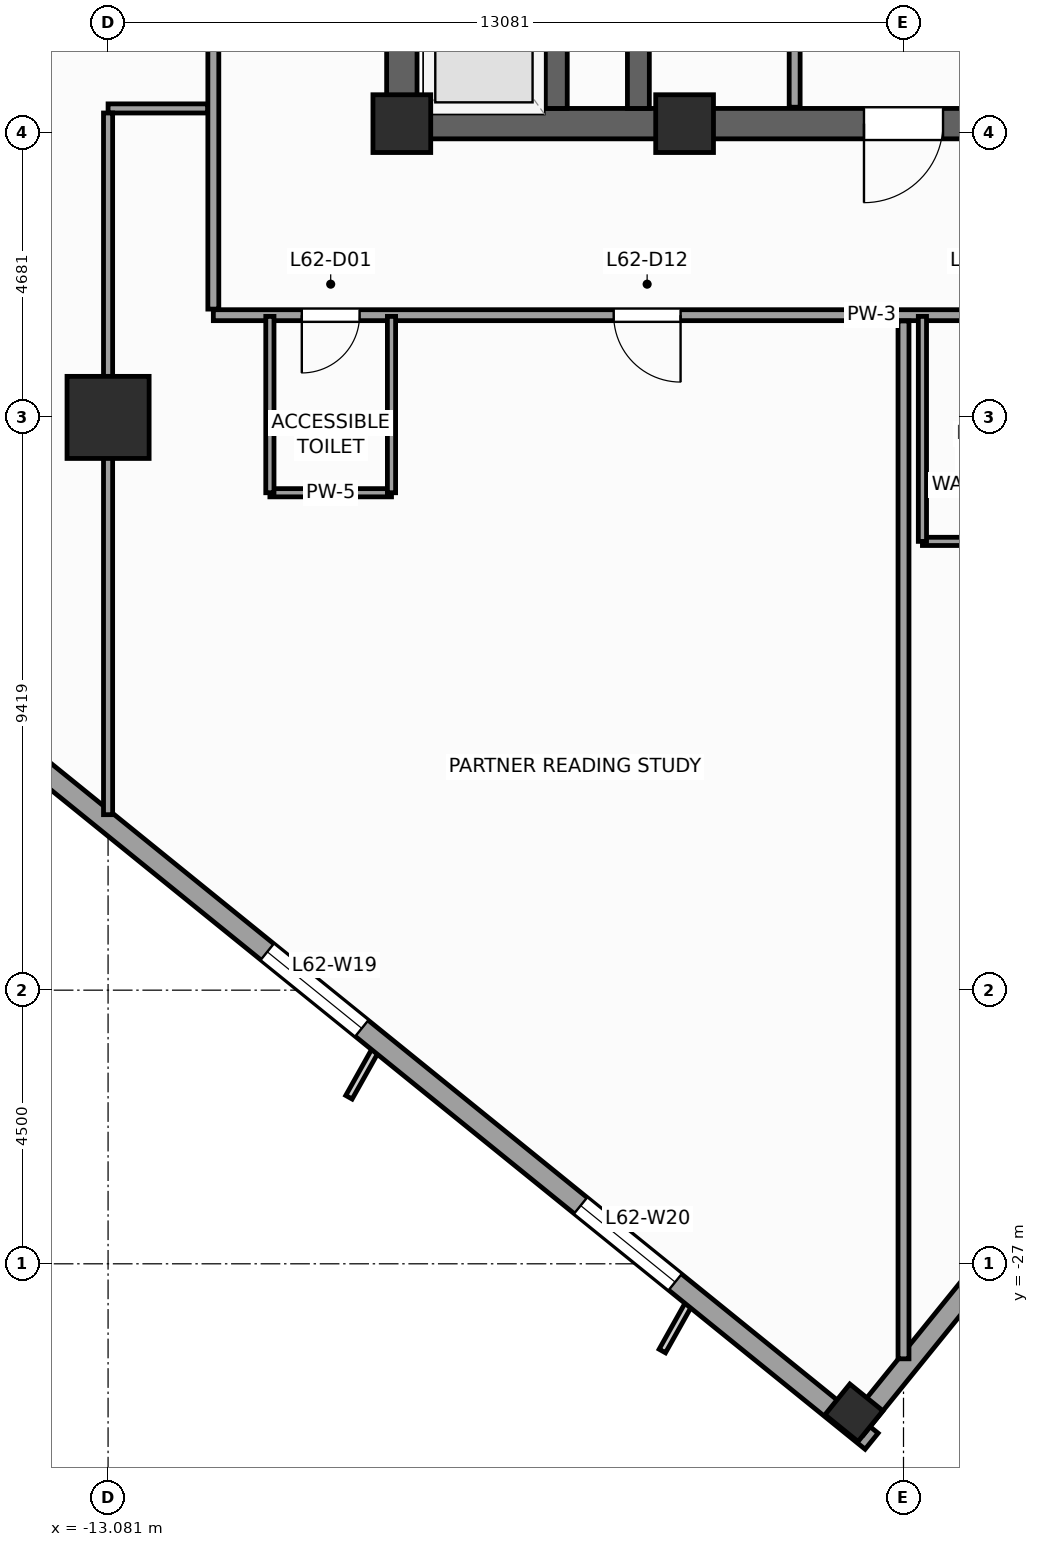
"""IFC4 building model, lengths in metres.
Left out: names, types, materials, properties, quantities, classifications, styles, units other than length and angle.
Written with IfcOpenShell. Run it as: python <this file> out.ifc"""

import sys

from ifc_helpers import new_model, si_unit, direction, frame, frame_2d, origin, origin_2d, place, context, subcontext, project, spatial, rectangle, extrude, source, transform, mapped, element, fill, save


model = new_model("IFC4")
c1 = context("Model", 3, precision=1e-05, world=origin(), true_north=direction((0.0, 1.0)))
c2 = subcontext(c1, "Body", "Model", "MODEL_VIEW")
j1 = project(units=[si_unit("LENGTHUNIT", "METRE"), si_unit("PLANEANGLEUNIT", "RADIAN")], contexts=[c1])
p1 = place(None, origin())
s1 = spatial("IfcSite", under=j1, at=p1, CompositionType="ELEMENT")
p2 = place(p1, origin())
s2 = spatial("IfcBuilding", under=s1, at=p2, CompositionType="ELEMENT")
p3 = place(p2, frame((0.0, 0.0, 256.3)))
s3 = spatial("IfcBuildingStorey", under=s2, at=p3, CompositionType="ELEMENT", Elevation=256.3)
p4 = place(p3, frame((-8.5, -8.25, 0.0), z_axis=(0.0, 0.0, 1.0), x_axis=(1.0, 0.0, 0.0)))
e1 = element("IfcWall", 1, at=p4, inside=s3, PredefinedType="SHEAR", context=c2, shape_type="SweptSolid", body=[
    extrude(rectangle(XDim=17.0, YDim=0.5, at=frame_2d((8.5, 0.0))), origin(), (0.0, 0.0, 1.0), 3.9),
])
p5 = place(p4, frame((7.85, 0.0, 0.0)))
e2 = element("IfcOpeningElement", 2, at=p5, cuts=e1, PredefinedType="OPENING", context=c2, shape_type="SweptSolid", body=[
    extrude(rectangle(XDim=1.3, YDim=2.2, at=frame_2d((0.65, 1.1))), frame((0.0, 0.26, 0.0), z_axis=(0.0, -1.0, 0.0), x_axis=(1.0, 0.0, 0.0)), (0.0, 0.0, 1.0), 0.52),
])
p6 = place(p3, frame((-8.25, -8.0, 0.0), z_axis=(0.0, 0.0, 1.0), x_axis=(0.0, 1.0, 0.0)))
e3 = element("IfcWall", 3, at=p6, inside=s3, PredefinedType="SHEAR", context=c2, shape_type="SweptSolid", body=[
    extrude(rectangle(XDim=16.0, YDim=0.5, at=frame_2d((8.0, 0.0))), origin(), (0.0, 0.0, 1.0), 3.9),
])
p7 = place(p6, frame((4.69, 0.0, 0.0)))
e4 = element("IfcOpeningElement", 4, at=p7, cuts=e3, PredefinedType="OPENING", context=c2, shape_type="SweptSolid", body=[
    extrude(rectangle(XDim=1.3, YDim=2.2, at=frame_2d((0.65, 1.1))), frame((0.0, 0.26, 0.0), z_axis=(0.0, -1.0, 0.0), x_axis=(1.0, 0.0, 0.0)), (0.0, 0.0, 1.0), 0.52),
])
p8 = place(p3, frame((-4.36, -8.0, 0.0), z_axis=(0.0, 0.0, 1.0), x_axis=(0.0, 1.0, 0.0)))
e5 = element("IfcWall", 5, at=p8, inside=s3, PredefinedType="SHEAR", context=c2, shape_type="SweptSolid", body=[
    extrude(rectangle(XDim=16.0, YDim=0.36, at=frame_2d((8.0, 0.0))), origin(), (0.0, 0.0, 1.0), 3.9),
])
p9 = place(p3, frame((-5.71, -8.0, 0.0), z_axis=(0.0, 0.0, 1.0), x_axis=(0.0, 1.0, 0.0)))
e6 = element("IfcWall", 6, at=p9, inside=s3, PredefinedType="SHEAR", context=c2, shape_type="SweptSolid", body=[
    extrude(rectangle(XDim=2.54, YDim=0.36, at=frame_2d((1.27, 0.0))), origin(), (0.0, 0.0, 1.0), 3.9),
])
m1 = source(origin(), c2, "Body", "SweptSolid", [
    extrude(rectangle(XDim=0.95, YDim=0.95, at=origin_2d()), origin(), (0.0, 0.0, 1.0), 3.9),
])
for number, where, z_axis, x_axis in (
    (7, (-8.25, -8.25, 0.0), (0.0, 0.0, 1.0), (1.0, 0.0, 0.0)),
    (8, (-3.6, -8.25, 0.0), (0.0, 0.0, 1.0), (1.0, 0.0, 0.0)),
):
    element("IfcColumn", number, at=place(p3, frame(where, z_axis=z_axis, x_axis=x_axis)), inside=s3, PredefinedType="PILASTER", context=c2, shape_type="MappedRepresentation", body=[
        mapped(m1, transform((0.0, 0.0, 0.0), scale=1.0)),
    ])
m2 = source(origin(), c2, "Body", "SweptSolid", [
    extrude(rectangle(XDim=1.35, YDim=1.35, at=origin_2d()), origin(), (0.0, 0.0, 1.0), 3.9),
])
p10 = place(p3, frame((-13.081, -13.081, 0.0), z_axis=(0.0, 0.0, 1.0), x_axis=(1.0, 0.0, 0.0)))
e9 = element("IfcColumn", 9, at=p10, inside=s3, PredefinedType="COLUMN", context=c2, shape_type="MappedRepresentation", body=[
    mapped(m2, transform((0.0, 0.0, 0.0), scale=1.0)),
])
m3 = source(origin(), c2, "Body", "SweptSolid", [
    extrude(rectangle(XDim=0.65, YDim=0.7, at=origin_2d()), origin(), (0.0, 0.0, 1.0), 3.9),
])
p11 = place(p3, frame((-0.815, -29.45, 0.0), z_axis=(0.0, 0.0, 1.0), x_axis=(0.62932039105, 0.777145961457, 0.0)))
e10 = element("IfcColumn", 10, at=p11, inside=s3, PredefinedType="COLUMN", context=c2, shape_type="MappedRepresentation", body=[
    mapped(m3, transform((0.0, 0.0, 0.0), scale=1.0)),
])
p12 = place(p3, frame((-29.154, -6.733, 0.0), z_axis=(0.0, 0.0, 1.0), x_axis=(0.77714192302, -0.629325378072, 0.0)))
e11 = element("IfcWall", 11, at=p12, inside=s3, PredefinedType="STANDARD", context=c2, shape_type="SweptSolid", body=[
    extrude(rectangle(XDim=36.84, YDim=0.34, at=frame_2d((18.42, 0.0))), origin(), (0.0, 0.0, 1.0), 2.02),
])
p13 = place(p12, frame((3.421, 0.0, 0.49)))
e12 = element("IfcOpeningElement", 12, at=p13, cuts=e11, PredefinedType="OPENING", context=c2, shape_type="SweptSolid", body=[
    extrude(rectangle(XDim=2.0, YDim=1.45, at=frame_2d((1.0, 0.725))), frame((0.0, 0.18, 0.0), z_axis=(0.0, -1.0, 0.0), x_axis=(1.0, 0.0, 0.0)), (0.0, 0.0, 1.0), 0.36),
])
p14 = place(p12, frame((9.684, 0.0, 0.49)))
e13 = element("IfcOpeningElement", 13, at=p14, cuts=e11, PredefinedType="OPENING", context=c2, shape_type="SweptSolid", body=[
    extrude(rectangle(XDim=2.0, YDim=1.45, at=frame_2d((1.0, 0.725))), frame((0.0, 0.18, 0.0), z_axis=(0.0, -1.0, 0.0), x_axis=(1.0, 0.0, 0.0)), (0.0, 0.0, 1.0), 0.36),
])
p15 = place(p12, frame((15.183, 0.0, 0.49)))
e14 = element("IfcOpeningElement", 14, at=p15, cuts=e11, PredefinedType="OPENING", context=c2, shape_type="SweptSolid", body=[
    extrude(rectangle(XDim=2.0, YDim=1.45, at=frame_2d((1.0, 0.725))), frame((0.0, 0.18, 0.0), z_axis=(0.0, -1.0, 0.0), x_axis=(1.0, 0.0, 0.0)), (0.0, 0.0, 1.0), 0.36),
])
p16 = place(p12, frame((24.051, 0.0, 0.49)))
e15 = element("IfcOpeningElement", 15, at=p16, cuts=e11, PredefinedType="OPENING", context=c2, shape_type="SweptSolid", body=[
    extrude(rectangle(XDim=2.0, YDim=1.45, at=frame_2d((1.0, 0.725))), frame((0.0, 0.18, 0.0), z_axis=(0.0, -1.0, 0.0), x_axis=(1.0, 0.0, 0.0)), (0.0, 0.0, 1.0), 0.36),
])
p17 = place(p12, frame((30.682, 0.0, 0.49)))
e16 = element("IfcOpeningElement", 16, at=p17, cuts=e11, PredefinedType="OPENING", context=c2, shape_type="SweptSolid", body=[
    extrude(rectangle(XDim=2.0, YDim=1.45, at=frame_2d((1.0, 0.725))), frame((0.0, 0.18, 0.0), z_axis=(0.0, -1.0, 0.0), x_axis=(1.0, 0.0, 0.0)), (0.0, 0.0, 1.0), 0.36),
])
p18 = place(p3, frame((-0.789, -29.703, 0.0), z_axis=(0.0, 0.0, 1.0), x_axis=(0.629323365087, 0.77714355312, 0.0)))
e17 = element("IfcWall", 17, at=p18, inside=s3, PredefinedType="STANDARD", context=c2, shape_type="SweptSolid", body=[
    extrude(rectangle(XDim=5.5, YDim=0.34, at=frame_2d((2.75, 0.0))), origin(), (0.0, 0.0, 1.0), 3.5),
])
p19 = place(p3, frame((-1.79, -7.98, 0.0), z_axis=(0.0, 0.0, 1.0), x_axis=(0.0, 1.0, 0.0)))
e18 = element("IfcWall", 18, at=p19, inside=s3, PredefinedType="PARTITIONING", context=c2, shape_type="SweptSolid", body=[
    extrude(rectangle(XDim=12.38, YDim=0.18, at=frame_2d((6.19, 0.0))), origin(), (0.0, 0.0, 1.0), 3.5),
])
p20 = place(p19, frame((8.8, 0.0, 0.0)))
e19 = element("IfcOpeningElement", 19, at=p20, cuts=e18, PredefinedType="OPENING", context=c2, shape_type="SweptSolid", body=[
    extrude(rectangle(XDim=1.1, YDim=2.2, at=frame_2d((0.55, 1.1))), frame((0.0, 0.1, 0.0), z_axis=(0.0, -1.0, 0.0), x_axis=(1.0, 0.0, 0.0)), (0.0, 0.0, 1.0), 0.2),
])
p21 = place(p19, frame((10.86, 0.0, 0.0)))
e20 = element("IfcOpeningElement", 20, at=p21, cuts=e18, PredefinedType="OPENING", context=c2, shape_type="SweptSolid", body=[
    extrude(rectangle(XDim=1.1, YDim=2.2, at=frame_2d((0.55, 1.1))), frame((0.0, 0.1, 0.0), z_axis=(0.0, -1.0, 0.0), x_axis=(1.0, 0.0, 0.0)), (0.0, 0.0, 1.0), 0.2),
])
p22 = place(p19, frame((1.4, 0.0, 0.0)))
e21 = element("IfcOpeningElement", 21, at=p22, cuts=e18, PredefinedType="OPENING", context=c2, shape_type="SweptSolid", body=[
    extrude(rectangle(XDim=1.15, YDim=2.25, at=frame_2d((0.575, 1.125))), frame((0.0, 0.1, 0.0), z_axis=(0.0, -1.0, 0.0), x_axis=(1.0, 0.0, 0.0)), (0.0, 0.0, 1.0), 0.2),
])
p23 = place(p19, frame((5.6, 0.0, 0.0)))
e22 = element("IfcOpeningElement", 22, at=p23, cuts=e18, PredefinedType="OPENING", context=c2, shape_type="SweptSolid", body=[
    extrude(rectangle(XDim=1.15, YDim=2.25, at=frame_2d((0.575, 1.125))), frame((0.0, 0.1, 0.0), z_axis=(0.0, -1.0, 0.0), x_axis=(1.0, 0.0, 0.0)), (0.0, 0.0, 1.0), 0.2),
])
p24 = place(p3, frame((-11.35, -11.4, 0.0), z_axis=(0.0, 0.0, 1.0), x_axis=(1.0, 0.0, 0.0)))
e23 = element("IfcWall", 23, at=p24, inside=s3, PredefinedType="PARTITIONING", context=c2, shape_type="SweptSolid", body=[
    extrude(rectangle(XDim=21.65, YDim=0.18, at=frame_2d((10.825, 0.0))), origin(), (0.0, 0.0, 1.0), 3.5),
])
p25 = place(p24, frame((1.455, 0.0, 0.0)))
e24 = element("IfcOpeningElement", 24, at=p25, cuts=e23, PredefinedType="OPENING", context=c2, shape_type="SweptSolid", body=[
    extrude(rectangle(XDim=0.95, YDim=2.1, at=frame_2d((0.475, 1.05))), frame((0.0, 0.1, 0.0), z_axis=(0.0, -1.0, 0.0), x_axis=(1.0, 0.0, 0.0)), (0.0, 0.0, 1.0), 0.2),
])
p26 = place(p24, frame((12.311, 0.0, 0.0)))
e25 = element("IfcOpeningElement", 25, at=p26, cuts=e23, PredefinedType="OPENING", context=c2, shape_type="SweptSolid", body=[
    extrude(rectangle(XDim=0.95, YDim=2.1, at=frame_2d((0.475, 1.05))), frame((0.0, 0.1, 0.0), z_axis=(0.0, -1.0, 0.0), x_axis=(1.0, 0.0, 0.0)), (0.0, 0.0, 1.0), 0.2),
])
p27 = place(p24, frame((17.06, 0.0, 0.0)))
e26 = element("IfcOpeningElement", 26, at=p27, cuts=e23, PredefinedType="OPENING", context=c2, shape_type="SweptSolid", body=[
    extrude(rectangle(XDim=1.1, YDim=2.2, at=frame_2d((0.55, 1.1))), frame((0.0, 0.1, 0.0), z_axis=(0.0, -1.0, 0.0), x_axis=(1.0, 0.0, 0.0)), (0.0, 0.0, 1.0), 0.2),
])
p28 = place(p24, frame((6.584, 0.0, 0.0)))
e27 = element("IfcOpeningElement", 27, at=p28, cuts=e23, PredefinedType="OPENING", context=c2, shape_type="SweptSolid", body=[
    extrude(rectangle(XDim=1.1, YDim=2.2, at=frame_2d((0.55, 1.1))), frame((0.0, 0.1, 0.0), z_axis=(0.0, -1.0, 0.0), x_axis=(1.0, 0.0, 0.0)), (0.0, 0.0, 1.0), 0.2),
])
p29 = place(p3, frame((-11.35, -11.3, 0.0), z_axis=(0.0, 0.0, 1.0), x_axis=(0.0, 1.0, 0.0)))
e28 = element("IfcWall", 28, at=p29, inside=s3, PredefinedType="PARTITIONING", context=c2, shape_type="SweptSolid", body=[
    extrude(rectangle(XDim=23.65, YDim=0.18, at=frame_2d((11.825, 0.0))), origin(), (0.0, 0.0, 1.0), 3.5),
])
p30 = place(p29, frame((13.1, 0.0, 0.0)))
e29 = element("IfcOpeningElement", 29, at=p30, cuts=e28, PredefinedType="OPENING", context=c2, shape_type="SweptSolid", body=[
    extrude(rectangle(XDim=1.1, YDim=2.2, at=frame_2d((0.55, 1.1))), frame((0.0, 0.1, 0.0), z_axis=(0.0, -1.0, 0.0), x_axis=(1.0, 0.0, 0.0)), (0.0, 0.0, 1.0), 0.2),
])
p31 = place(p29, frame((16.85, 0.0, 0.0)))
e30 = element("IfcOpeningElement", 30, at=p31, cuts=e28, PredefinedType="OPENING", context=c2, shape_type="SweptSolid", body=[
    extrude(rectangle(XDim=1.1, YDim=2.2, at=frame_2d((0.55, 1.1))), frame((0.0, 0.1, 0.0), z_axis=(0.0, -1.0, 0.0), x_axis=(1.0, 0.0, 0.0)), (0.0, 0.0, 1.0), 0.2),
])
p32 = place(p29, frame((5.0, 0.0, 0.0)))
e31 = element("IfcOpeningElement", 31, at=p32, cuts=e28, PredefinedType="OPENING", context=c2, shape_type="SweptSolid", body=[
    extrude(rectangle(XDim=1.1, YDim=2.2, at=frame_2d((0.55, 1.1))), frame((0.0, 0.1, 0.0), z_axis=(0.0, -1.0, 0.0), x_axis=(1.0, 0.0, 0.0)), (0.0, 0.0, 1.0), 0.2),
])
p33 = place(p29, frame((9.25, 0.0, 0.0)))
e32 = element("IfcOpeningElement", 32, at=p33, cuts=e28, PredefinedType="OPENING", context=c2, shape_type="SweptSolid", body=[
    extrude(rectangle(XDim=1.1, YDim=2.2, at=frame_2d((0.55, 1.1))), frame((0.0, 0.1, 0.0), z_axis=(0.0, -1.0, 0.0), x_axis=(1.0, 0.0, 0.0)), (0.0, 0.0, 1.0), 0.2),
])
p34 = place(p3, frame((0.0, -11.495, 0.0), z_axis=(0.0, 0.0, 1.0), x_axis=(0.0, -1.0, 0.0)))
e33 = element("IfcWall", 33, at=p34, inside=s3, PredefinedType="PARTITIONING", context=c2, shape_type="SweptSolid", body=[
    extrude(rectangle(XDim=17.067, YDim=0.18, at=frame_2d((8.534, 0.0))), origin(), (0.0, 0.0, 1.0), 3.5),
])
p35 = place(p3, frame((-11.445, -8.0, 0.0), z_axis=(0.0, 0.0, 1.0), x_axis=(-1.0, 0.0, 0.0)))
e34 = element("IfcWall", 34, at=p35, inside=s3, PredefinedType="PARTITIONING", context=c2, shape_type="SweptSolid", body=[
    extrude(rectangle(XDim=1.636, YDim=0.15, at=frame_2d((0.818, 0.0))), origin(), (0.0, 0.0, 1.0), 3.5),
])
p36 = place(p3, frame((-13.081, -8.075, 0.0), z_axis=(0.0, 0.0, 1.0), x_axis=(0.0, -1.0, 0.0)))
e35 = element("IfcWall", 35, at=p36, inside=s3, PredefinedType="PARTITIONING", context=c2, shape_type="SweptSolid", body=[
    extrude(rectangle(XDim=11.539, YDim=0.15, at=frame_2d((5.77, 0.0))), origin(), (0.0, 0.0, 1.0), 2.05),
])
p37 = place(p3, frame((-10.42, -14.32, 0.0), z_axis=(0.0, 0.0, 1.0), x_axis=(1.0, 0.0, 0.0)))
e36 = element("IfcWall", 36, at=p37, inside=s3, PredefinedType="PARTITIONING", context=c2, shape_type="SweptSolid", body=[
    extrude(rectangle(XDim=2.0, YDim=0.135, at=frame_2d((1.0, 0.0))), origin(), (0.0, 0.0, 1.0), 3.5),
])
for number, where, z_axis, x_axis in (
    (37, (-8.42, -14.32, 0.0), (0.0, 0.0, 1.0), (0.0, 1.0, 0.0)),
    (38, (-10.42, -14.32, 0.0), (0.0, 0.0, 1.0), (0.0, 1.0, 0.0)),
):
    element("IfcWall", number, at=place(p3, frame(where, z_axis=z_axis, x_axis=x_axis)), inside=s3, PredefinedType="PARTITIONING", context=c2, shape_type="SweptSolid", body=[
        extrude(rectangle(XDim=2.9, YDim=0.135, at=frame_2d((1.45, 0.0))), origin(), (0.0, 0.0, 1.0), 3.5),
    ])
p38 = place(p3, frame((0.311, -15.12, 0.0), z_axis=(0.0, 0.0, 1.0), x_axis=(1.0, 0.0, 0.0)))
e39 = element("IfcWall", 39, at=p38, inside=s3, PredefinedType="PARTITIONING", context=c2, shape_type="SweptSolid", body=[
    extrude(rectangle(XDim=2.25, YDim=0.135, at=frame_2d((1.125, 0.0))), origin(), (0.0, 0.0, 1.0), 3.5),
])
p39 = place(p3, frame((0.311, -15.12, 0.0), z_axis=(0.0, 0.0, 1.0), x_axis=(0.0, 1.0, 0.0)))
e40 = element("IfcWall", 40, at=p39, inside=s3, PredefinedType="PARTITIONING", context=c2, shape_type="SweptSolid", body=[
    extrude(rectangle(XDim=3.7, YDim=0.135, at=frame_2d((1.85, 0.0))), origin(), (0.0, 0.0, 1.0), 3.5),
])
m4 = source(origin(), c2, "Body", "SweptSolid", [
    extrude(rectangle(XDim=2.0, YDim=1.45, at=frame_2d((1.0, 0.725))), frame((0.0, 0.03, 0.0), z_axis=(0.0, -1.0, 0.0), x_axis=(1.0, 0.0, 0.0)), (0.0, 0.0, 1.0), 0.06),
])
p40 = place(p16, origin())
e41 = element("IfcWindow", 41, at=p40, inside=s3, PartitioningType="SINGLE_PANEL", PredefinedType="WINDOW", context=c2, shape_type="MappedRepresentation", body=[
    mapped(m4, transform((0.0, 0.0, 0.0), scale=1.0)),
])
fill(e15, e41)
p41 = place(p17, origin())
e42 = element("IfcWindow", 42, at=p41, inside=s3, PartitioningType="SINGLE_PANEL", PredefinedType="WINDOW", context=c2, shape_type="MappedRepresentation", body=[
    mapped(m4, transform((0.0, 0.0, 0.0), scale=1.0)),
])
fill(e16, e42)
m5 = source(origin(), c2, "Body", "SweptSolid", [
    extrude(rectangle(XDim=1.3, YDim=2.2, at=frame_2d((0.65, 1.1))), frame((0.0, 0.025, 0.0), z_axis=(0.0, -1.0, 0.0), x_axis=(1.0, 0.0, 0.0)), (0.0, 0.0, 1.0), 0.05),
])
p42 = place(p5, frame((1.3, 0.0, 0.0), z_axis=(0.0, 0.0, 1.0), x_axis=(-1.0, 0.0, 0.0)))
e43 = element("IfcDoor", 43, at=p42, inside=s3, OperationType="SINGLE_SWING_LEFT", PredefinedType="DOOR", context=c2, shape_type="MappedRepresentation", body=[
    mapped(m5, transform((0.0, 0.0, 0.0), scale=1.0)),
])
fill(e2, e43)
m6 = source(origin(), c2, "Body", "SweptSolid", [
    extrude(rectangle(XDim=0.95, YDim=2.1, at=frame_2d((0.475, 1.05))), frame((0.0, 0.025, 0.0), z_axis=(0.0, -1.0, 0.0), x_axis=(1.0, 0.0, 0.0)), (0.0, 0.0, 1.0), 0.05),
])
p43 = place(p25, frame((0.95, 0.0, 0.0), z_axis=(0.0, 0.0, 1.0), x_axis=(-1.0, 0.0, 0.0)))
e44 = element("IfcDoor", 44, at=p43, inside=s3, OperationType="SINGLE_SWING_LEFT", PredefinedType="DOOR", context=c2, shape_type="MappedRepresentation", body=[
    mapped(m6, transform((0.0, 0.0, 0.0), scale=1.0)),
])
fill(e24, e44)
m7 = source(origin(), c2, "Body", "SweptSolid", [
    extrude(rectangle(XDim=1.1, YDim=2.2, at=frame_2d((0.55, 1.1))), frame((0.0, 0.025, 0.0), z_axis=(0.0, -1.0, 0.0), x_axis=(1.0, 0.0, 0.0)), (0.0, 0.0, 1.0), 0.05),
])
p44 = place(p28, frame((1.1, 0.0, 0.0), z_axis=(0.0, 0.0, 1.0), x_axis=(-1.0, 0.0, 0.0)))
e45 = element("IfcDoor", 45, at=p44, inside=s3, OperationType="SINGLE_SWING_RIGHT", PredefinedType="DOOR", context=c2, shape_type="MappedRepresentation", body=[
    mapped(m7, transform((0.0, 0.0, 0.0), scale=1.0)),
])
fill(e27, e45)
save(model, sys.argv[1])
